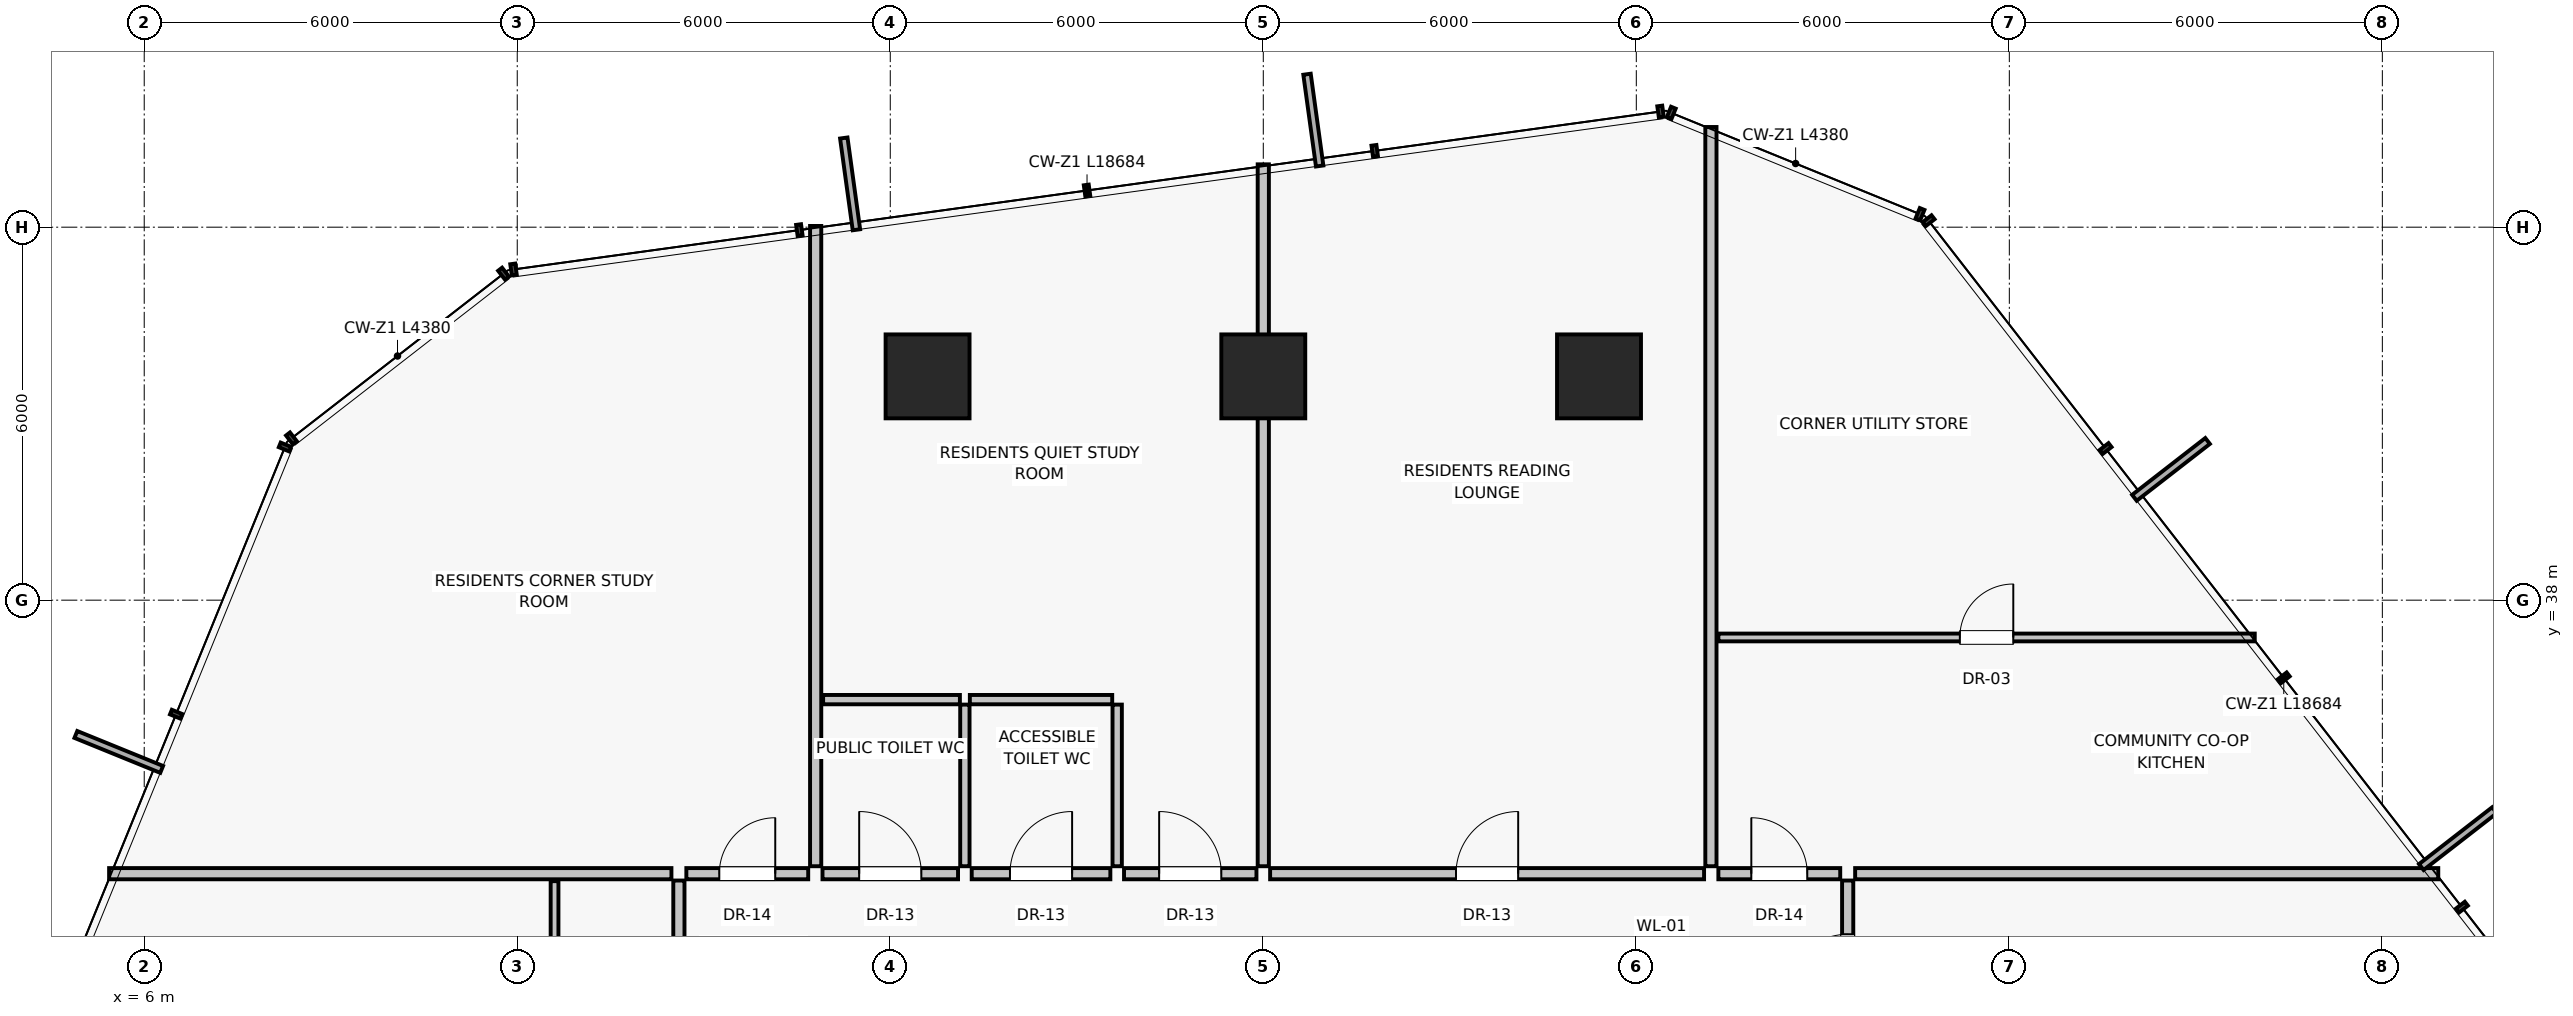
"""IFC4 building model, lengths in metres.
Left out: names, types, materials, properties, quantities, classifications, styles, units other than length and angle.
Written with IfcOpenShell. Run it as: python <this file> out.ifc"""

import sys

from ifc_helpers import new_model, si_unit, direction, frame, frame_2d, origin, origin_2d, place, context, subcontext, project, spatial, rectangle, extrude, source, transform, mapped, element, fill, save


model = new_model("IFC4")
c1 = context("Model", 3, precision=1e-05, world=origin(), true_north=direction((0.0, 1.0)))
c2 = subcontext(c1, "Body", "Model", "MODEL_VIEW")
j1 = project(units=[si_unit("LENGTHUNIT", "METRE"), si_unit("PLANEANGLEUNIT", "RADIAN")], contexts=[c1])
p1 = place(None, origin())
s1 = spatial("IfcSite", under=j1, at=p1, CompositionType="ELEMENT")
p2 = place(p1, origin())
s2 = spatial("IfcBuilding", under=s1, at=p2, CompositionType="ELEMENT")
p3 = place(p2, frame((0.0, 0.0, 50.05)))
s3 = spatial("IfcBuildingStorey", under=s2, at=p3, CompositionType="ELEMENT", Elevation=50.05)
for number, where, z_axis, x_axis in (
    (1, (29.4, 41.6, 0.0), (0.0, 0.0, 1.0), (1.0, 0.0, 0.0)),
    (2, (24.0, 41.6, 0.0), (0.0, 0.0, 1.0), (1.0, 0.0, 0.0)),
    (3, (18.6, 41.6, 0.0), (0.0, 0.0, 1.0), (1.0, 0.0, 0.0)),
):
    element("IfcColumn", number, at=place(p3, frame(where, z_axis=z_axis, x_axis=x_axis)), inside=s3, PredefinedType="COLUMN", context=c2, shape_type="SweptSolid", body=[
        extrude(rectangle(XDim=1.35, YDim=1.35, at=origin_2d()), origin(), (0.0, 0.0, 1.0), 3.25),
    ])
p4 = place(p3, frame((16.8, 33.72, 0.0), z_axis=(0.0, 0.0, 1.0), x_axis=(0.0, 1.0, 0.0)))
e4 = element("IfcWall", 4, at=p4, inside=s3, PredefinedType="PARTITIONING", context=c2, shape_type="SweptSolid", body=[
    extrude(rectangle(XDim=10.3, YDim=0.18, at=frame_2d((5.15, 0.0))), origin(), (0.0, 0.0, 1.0), 3.0),
])
p5 = place(p3, frame((31.2, 33.72, 0.0), z_axis=(0.0, 0.0, 1.0), x_axis=(0.0, 1.0, 0.0)))
e5 = element("IfcWall", 5, at=p5, inside=s3, PredefinedType="PARTITIONING", context=c2, shape_type="SweptSolid", body=[
    extrude(rectangle(XDim=11.892, YDim=0.18, at=frame_2d((5.946, 0.0))), origin(), (0.0, 0.0, 1.0), 3.0),
])
p6 = place(p3, frame((16.91, 33.6, 0.0), z_axis=(0.0, 0.0, 1.0), x_axis=(1.0, 0.0, 0.0)))
e6 = element("IfcWall", 6, at=p6, inside=s3, PredefinedType="PARTITIONING", context=c2, shape_type="SweptSolid", body=[
    extrude(rectangle(XDim=2.18, YDim=0.18, at=frame_2d((1.09, 0.0))), origin(), (0.0, 0.0, 1.0), 3.0),
])
p7 = place(p6, frame((0.59, 0.0, 0.0)))
e7 = element("IfcOpeningElement", 7, at=p7, cuts=e6, PredefinedType="OPENING", context=c2, shape_type="SweptSolid", body=[
    extrude(rectangle(XDim=1.0, YDim=2.01, at=frame_2d((0.5, 1.005))), frame((0.0, 0.1, 0.0), z_axis=(0.0, -1.0, 0.0), x_axis=(1.0, 0.0, 0.0)), (0.0, 0.0, 1.0), 0.2),
])
p8 = place(p3, frame((19.31, 33.6, 0.0), z_axis=(0.0, 0.0, 1.0), x_axis=(1.0, 0.0, 0.0)))
e8 = element("IfcWall", 8, at=p8, inside=s3, PredefinedType="PARTITIONING", context=c2, shape_type="SweptSolid", body=[
    extrude(rectangle(XDim=2.23, YDim=0.18, at=frame_2d((1.115, 0.0))), origin(), (0.0, 0.0, 1.0), 3.0),
])
p9 = place(p8, frame((0.615, 0.0, 0.0)))
e9 = element("IfcOpeningElement", 9, at=p9, cuts=e8, PredefinedType="OPENING", context=c2, shape_type="SweptSolid", body=[
    extrude(rectangle(XDim=1.0, YDim=2.01, at=frame_2d((0.5, 1.005))), frame((0.0, 0.1, 0.0), z_axis=(0.0, -1.0, 0.0), x_axis=(1.0, 0.0, 0.0)), (0.0, 0.0, 1.0), 0.2),
])
p10 = place(p3, frame((21.76, 33.6, 0.0), z_axis=(0.0, 0.0, 1.0), x_axis=(1.0, 0.0, 0.0)))
e10 = element("IfcWall", 10, at=p10, inside=s3, PredefinedType="PARTITIONING", context=c2, shape_type="SweptSolid", body=[
    extrude(rectangle(XDim=2.13, YDim=0.18, at=frame_2d((1.065, 0.0))), origin(), (0.0, 0.0, 1.0), 3.0),
])
p11 = place(p10, frame((0.565, 0.0, 0.0)))
e11 = element("IfcOpeningElement", 11, at=p11, cuts=e10, PredefinedType="OPENING", context=c2, shape_type="SweptSolid", body=[
    extrude(rectangle(XDim=1.0, YDim=2.01, at=frame_2d((0.5, 1.005))), frame((0.0, 0.1, 0.0), z_axis=(0.0, -1.0, 0.0), x_axis=(1.0, 0.0, 0.0)), (0.0, 0.0, 1.0), 0.2),
])
p12 = place(p3, frame((24.11, 33.6, 0.0), z_axis=(0.0, 0.0, 1.0), x_axis=(1.0, 0.0, 0.0)))
e12 = element("IfcWall", 12, at=p12, inside=s3, PredefinedType="PARTITIONING", context=c2, shape_type="SweptSolid", body=[
    extrude(rectangle(XDim=6.98, YDim=0.18, at=frame_2d((3.49, 0.0))), origin(), (0.0, 0.0, 1.0), 3.0),
])
p13 = place(p12, frame((2.99, 0.0, 0.0)))
e13 = element("IfcOpeningElement", 13, at=p13, cuts=e12, PredefinedType="OPENING", context=c2, shape_type="SweptSolid", body=[
    extrude(rectangle(XDim=1.0, YDim=2.01, at=frame_2d((0.5, 1.005))), frame((0.0, 0.1, 0.0), z_axis=(0.0, -1.0, 0.0), x_axis=(1.0, 0.0, 0.0)), (0.0, 0.0, 1.0), 0.2),
])
for number, where, z_axis, x_axis in (
    (14, (19.2, 33.72, 0.0), (0.0, 0.0, 1.0), (0.0, 1.0, 0.0)),
    (15, (21.65, 33.72, 0.0), (0.0, 0.0, 1.0), (0.0, 1.0, 0.0)),
):
    element("IfcWall", number, at=place(p3, frame(where, z_axis=z_axis, x_axis=x_axis)), inside=s3, PredefinedType="PARTITIONING", context=c2, shape_type="SweptSolid", body=[
        extrude(rectangle(XDim=2.6, YDim=0.15, at=frame_2d((1.3, 0.0))), origin(), (0.0, 0.0, 1.0), 3.0),
    ])
p14 = place(p3, frame((16.92, 36.4, 0.0), z_axis=(0.0, 0.0, 1.0), x_axis=(1.0, 0.0, 0.0)))
e16 = element("IfcWall", 16, at=p14, inside=s3, PredefinedType="PARTITIONING", context=c2, shape_type="SweptSolid", body=[
    extrude(rectangle(XDim=2.2, YDim=0.15, at=frame_2d((1.1, 0.0))), origin(), (0.0, 0.0, 1.0), 2.58),
])
p15 = place(p3, frame((19.28, 36.4, 0.0), z_axis=(0.0, 0.0, 1.0), x_axis=(1.0, 0.0, 0.0)))
e17 = element("IfcWall", 17, at=p15, inside=s3, PredefinedType="PARTITIONING", context=c2, shape_type="SweptSolid", body=[
    extrude(rectangle(XDim=2.29, YDim=0.15, at=frame_2d((1.145, 0.0))), origin(), (0.0, 0.0, 1.0), 2.58),
])
p16 = place(p3, frame((24.0, 33.72, 0.0), z_axis=(0.0, 0.0, 1.0), x_axis=(0.0, 1.0, 0.0)))
e18 = element("IfcWall", 18, at=p16, inside=s3, PredefinedType="PARTITIONING", context=c2, shape_type="SweptSolid", body=[
    extrude(rectangle(XDim=11.291, YDim=0.18, at=frame_2d((5.646, 0.0))), origin(), (0.0, 0.0, 1.0), 3.0),
])
p17 = place(p3, frame((14.48, 33.6, 0.0), z_axis=(0.0, 0.0, 1.0), x_axis=(-1.0, 0.0, 0.0)))
e19 = element("IfcWall", 19, at=p17, inside=s3, PredefinedType="PARTITIONING", context=c2, shape_type="SweptSolid", body=[
    extrude(rectangle(XDim=9.045, YDim=0.18, at=frame_2d((4.522, 0.0))), origin(), (0.0, 0.0, 1.0), 3.0),
])
p18 = place(p3, frame((14.6, 24.618, 0.0), z_axis=(0.0, 0.0, 1.0), x_axis=(0.0, 1.0, 0.0)))
e20 = element("IfcWall", 20, at=p18, inside=s3, PredefinedType="PARTITIONING", context=c2, shape_type="SweptSolid", body=[
    extrude(rectangle(XDim=8.872, YDim=0.18, at=frame_2d((4.436, 0.0))), origin(), (0.0, 0.0, 1.0), 3.0),
])
p19 = place(p18, frame((2.995, 0.0, 0.0)))
e21 = element("IfcOpeningElement", 21, at=p19, cuts=e20, PredefinedType="OPENING", context=c2, shape_type="SweptSolid", body=[
    extrude(rectangle(XDim=0.95, YDim=2.02, at=frame_2d((0.475, 1.01))), frame((0.0, 0.1, 0.0), z_axis=(0.0, -1.0, 0.0), x_axis=(1.0, 0.0, 0.0)), (0.0, 0.0, 1.0), 0.2),
])
p20 = place(p3, frame((12.6, 29.518, 0.0), z_axis=(0.0, 0.0, 1.0), x_axis=(0.0, 1.0, 0.0)))
e22 = element("IfcWall", 22, at=p20, inside=s3, PredefinedType="PARTITIONING", context=c2, shape_type="SweptSolid", body=[
    extrude(rectangle(XDim=3.962, YDim=0.125, at=frame_2d((1.981, 0.0))), origin(), (0.0, 0.0, 1.0), 3.0),
])
p21 = place(p3, frame((33.52, 33.6, 0.0), z_axis=(0.0, 0.0, 1.0), x_axis=(1.0, 0.0, 0.0)))
e23 = element("IfcWall", 23, at=p21, inside=s3, PredefinedType="PARTITIONING", context=c2, shape_type="SweptSolid", body=[
    extrude(rectangle(XDim=9.379, YDim=0.18, at=frame_2d((4.69, 0.0))), origin(), (0.0, 0.0, 1.0), 3.0),
])
p22 = place(p3, frame((33.4, 30.76, 0.0), z_axis=(0.0, 0.0, 1.0), x_axis=(0.0, 1.0, 0.0)))
e24 = element("IfcWall", 24, at=p22, inside=s3, PredefinedType="PARTITIONING", context=c2, shape_type="SweptSolid", body=[
    extrude(rectangle(XDim=2.73, YDim=0.18, at=frame_2d((1.365, 0.0))), origin(), (0.0, 0.0, 1.0), 3.0),
])
p23 = place(p22, frame((0.865, 0.0, 0.0)))
e25 = element("IfcOpeningElement", 25, at=p23, cuts=e24, PredefinedType="OPENING", context=c2, shape_type="SweptSolid", body=[
    extrude(rectangle(XDim=1.0, YDim=2.01, at=frame_2d((0.5, 1.005))), frame((0.0, 0.1, 0.0), z_axis=(0.0, -1.0, 0.0), x_axis=(1.0, 0.0, 0.0)), (0.0, 0.0, 1.0), 0.2),
])
p24 = place(p3, frame((14.72, 33.6, 0.0), z_axis=(0.0, 0.0, 1.0), x_axis=(1.0, 0.0, 0.0)))
e26 = element("IfcWall", 26, at=p24, inside=s3, PredefinedType="PARTITIONING", context=c2, shape_type="SweptSolid", body=[
    extrude(rectangle(XDim=1.96, YDim=0.18, at=frame_2d((0.98, 0.0))), origin(), (0.0, 0.0, 1.0), 3.0),
])
p25 = place(p24, frame((0.53, 0.0, 0.0)))
e27 = element("IfcOpeningElement", 27, at=p25, cuts=e26, PredefinedType="OPENING", context=c2, shape_type="SweptSolid", body=[
    extrude(rectangle(XDim=0.9, YDim=2.01, at=frame_2d((0.45, 1.005))), frame((0.0, 0.1, 0.0), z_axis=(0.0, -1.0, 0.0), x_axis=(1.0, 0.0, 0.0)), (0.0, 0.0, 1.0), 0.2),
])
p26 = place(p3, frame((31.32, 33.6, 0.0), z_axis=(0.0, 0.0, 1.0), x_axis=(1.0, 0.0, 0.0)))
e28 = element("IfcWall", 28, at=p26, inside=s3, PredefinedType="PARTITIONING", context=c2, shape_type="SweptSolid", body=[
    extrude(rectangle(XDim=1.96, YDim=0.18, at=frame_2d((0.98, 0.0))), origin(), (0.0, 0.0, 1.0), 3.0),
])
p27 = place(p26, frame((0.53, 0.0, 0.0)))
e29 = element("IfcOpeningElement", 29, at=p27, cuts=e28, PredefinedType="OPENING", context=c2, shape_type="SweptSolid", body=[
    extrude(rectangle(XDim=0.9, YDim=2.01, at=frame_2d((0.45, 1.005))), frame((0.0, 0.1, 0.0), z_axis=(0.0, -1.0, 0.0), x_axis=(1.0, 0.0, 0.0)), (0.0, 0.0, 1.0), 0.2),
])
p28 = place(p3, frame((31.32, 37.4, 0.0), z_axis=(0.0, 0.0, 1.0), x_axis=(1.0, 0.0, 0.0)))
e30 = element("IfcWall", 30, at=p28, inside=s3, PredefinedType="PARTITIONING", context=c2, shape_type="SweptSolid", body=[
    extrude(rectangle(XDim=8.627, YDim=0.125, at=frame_2d((4.314, 0.0))), origin(), (0.0, 0.0, 1.0), 3.0),
])
p29 = place(p28, frame((3.884, 0.0, 0.0)))
e31 = element("IfcOpeningElement", 31, at=p29, cuts=e30, PredefinedType="OPENING", context=c2, shape_type="SweptSolid", body=[
    extrude(rectangle(XDim=0.86, YDim=2.01, at=frame_2d((0.43, 1.005))), frame((0.0, 0.073, 0.0), z_axis=(0.0, -1.0, 0.0), x_axis=(1.0, 0.0, 0.0)), (0.0, 0.0, 1.0), 0.145),
])
m1 = source(origin(), c2, "Body", "SweptSolid", [
    extrude(rectangle(XDim=1.0, YDim=2.01, at=frame_2d((0.5, 1.005))), frame((0.0, 0.025, 0.0), z_axis=(0.0, -1.0, 0.0), x_axis=(1.0, 0.0, 0.0)), (0.0, 0.0, 1.0), 0.05),
])
p30 = place(p7, origin())
e32 = element("IfcDoor", 32, at=p30, inside=s3, OperationType="SINGLE_SWING_LEFT", PredefinedType="DOOR", context=c2, shape_type="MappedRepresentation", body=[
    mapped(m1, transform((0.0, 0.0, 0.0), scale=1.0)),
])
fill(e7, e32)
p31 = place(p9, origin())
e33 = element("IfcDoor", 33, at=p31, inside=s3, OperationType="SINGLE_SWING_RIGHT", PredefinedType="DOOR", context=c2, shape_type="MappedRepresentation", body=[
    mapped(m1, transform((0.0, 0.0, 0.0), scale=1.0)),
])
fill(e9, e33)
p32 = place(p11, origin())
e34 = element("IfcDoor", 34, at=p32, inside=s3, OperationType="SINGLE_SWING_LEFT", PredefinedType="DOOR", context=c2, shape_type="MappedRepresentation", body=[
    mapped(m1, transform((0.0, 0.0, 0.0), scale=1.0)),
])
fill(e11, e34)
p33 = place(p13, origin())
e35 = element("IfcDoor", 35, at=p33, inside=s3, OperationType="SINGLE_SWING_RIGHT", PredefinedType="DOOR", context=c2, shape_type="MappedRepresentation", body=[
    mapped(m1, transform((0.0, 0.0, 0.0), scale=1.0)),
])
fill(e13, e35)
p34 = place(p23, origin())
e36 = element("IfcDoor", 36, at=p34, inside=s3, OperationType="SINGLE_SWING_LEFT", PredefinedType="DOOR", context=c2, shape_type="MappedRepresentation", body=[
    mapped(m1, transform((0.0, 0.0, 0.0), scale=1.0)),
])
fill(e25, e36)
m2 = source(origin(), c2, "Body", "SweptSolid", [
    extrude(rectangle(XDim=0.9, YDim=2.01, at=frame_2d((0.45, 1.005))), frame((0.0, 0.025, 0.0), z_axis=(0.0, -1.0, 0.0), x_axis=(1.0, 0.0, 0.0)), (0.0, 0.0, 1.0), 0.05),
])
p35 = place(p25, origin())
e37 = element("IfcDoor", 37, at=p35, inside=s3, OperationType="SINGLE_SWING_RIGHT", PredefinedType="DOOR", context=c2, shape_type="MappedRepresentation", body=[
    mapped(m2, transform((0.0, 0.0, 0.0), scale=1.0)),
])
fill(e27, e37)
p36 = place(p27, origin())
e38 = element("IfcDoor", 38, at=p36, inside=s3, OperationType="SINGLE_SWING_LEFT", PredefinedType="DOOR", context=c2, shape_type="MappedRepresentation", body=[
    mapped(m2, transform((0.0, 0.0, 0.0), scale=1.0)),
])
fill(e29, e38)
m3 = source(origin(), c2, "Body", "SweptSolid", [
    extrude(rectangle(XDim=0.86, YDim=2.01, at=frame_2d((0.43, 1.005))), frame((0.0, 0.025, 0.0), z_axis=(0.0, -1.0, 0.0), x_axis=(1.0, 0.0, 0.0)), (0.0, 0.0, 1.0), 0.05),
])
p37 = place(p29, origin())
e39 = element("IfcDoor", 39, at=p37, inside=s3, OperationType="SINGLE_SWING_RIGHT", PredefinedType="DOOR", context=c2, shape_type="MappedRepresentation", body=[
    mapped(m3, transform((0.0, 0.0, 0.0), scale=1.0)),
])
fill(e31, e39)
save(model, sys.argv[1])
